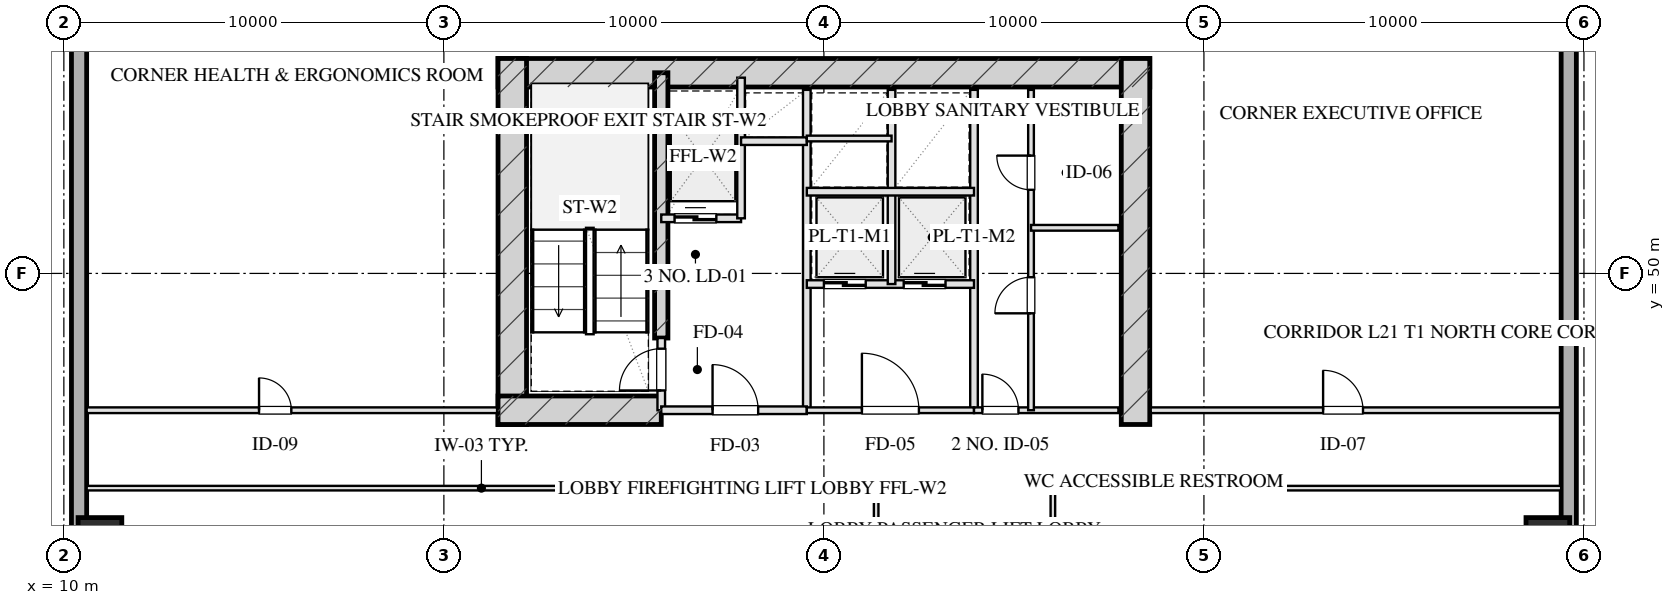
"""IFC4 building model, lengths in metres.
Left out: names, types, materials, properties, quantities, classifications, styles, units other than length and angle.
Written with IfcOpenShell. Run it as: python <this file> out.ifc"""

import sys

from ifc_helpers import new_model, si_unit, direction, frame, frame_2d, origin, origin_2d, place, context, subcontext, project, spatial, rectangle, hollow_rectangle, extrude, element, fill, save


model = new_model("IFC4")
c1 = context("Model", 3, precision=1e-05, world=origin(), true_north=direction((0.0, 1.0)))
c2 = subcontext(c1, "Body", "Model", "MODEL_VIEW")
j1 = project(units=[si_unit("LENGTHUNIT", "METRE"), si_unit("PLANEANGLEUNIT", "RADIAN")], contexts=[c1])
p1 = place(None, origin())
s1 = spatial("IfcSite", under=j1, at=p1, CompositionType="ELEMENT")
p2 = place(p1, origin())
s2 = spatial("IfcBuilding", under=s1, at=p2, CompositionType="ELEMENT")
p3 = place(p2, frame((0.0, 0.0, 85.1)))
s3 = spatial("IfcBuildingStorey", under=s2, at=p3, CompositionType="ELEMENT", Elevation=85.1)
p4 = place(p3, frame((21.425, 55.28, 0.0), z_axis=(0.0, 0.0, 1.0), x_axis=(1.0, 0.0, 0.0)))
e1 = element("IfcWall", 1, at=p4, inside=s3, PredefinedType="SHEAR", context=c2, shape_type="SweptSolid", body=[
    extrude(rectangle(XDim=17.15, YDim=0.75, at=frame_2d((8.575, 0.0))), origin(), (0.0, 0.0, 1.0), 3.45),
])
for number, where, z_axis, x_axis in (
    (2, (21.8, 46.025, 0.0), (0.0, 0.0, 1.0), (0.0, 1.0, 0.0)),
    (3, (38.2, 46.025, 0.0), (0.0, 0.0, 1.0), (0.0, 1.0, 0.0)),
):
    element("IfcWall", number, at=place(p3, frame(where, z_axis=z_axis, x_axis=x_axis)), inside=s3, PredefinedType="SHEAR", context=c2, shape_type="SweptSolid", body=[
        extrude(rectangle(XDim=9.63, YDim=0.75, at=frame_2d((4.815, 0.0))), origin(), (0.0, 0.0, 1.0), 3.45),
    ])
p5 = place(p3, frame((25.72, 48.3, 0.0), z_axis=(0.0, 0.0, 1.0), x_axis=(0.0, 1.0, 0.0)))
e4 = element("IfcWall", 4, at=p5, inside=s3, PredefinedType="SHEAR", context=c2, shape_type="SweptSolid", body=[
    extrude(rectangle(XDim=6.98, YDim=0.35, at=frame_2d((3.49, 0.0))), origin(), (0.0, 0.0, 1.0), 3.45),
])
p6 = place(p3, frame((21.425, 46.4, 0.0), z_axis=(0.0, 0.0, 1.0), x_axis=(1.0, 0.0, 0.0)))
e5 = element("IfcWall", 5, at=p6, inside=s3, PredefinedType="SHEAR", context=c2, shape_type="SweptSolid", body=[
    extrude(rectangle(XDim=4.295, YDim=0.75, at=frame_2d((2.147, 0.0))), origin(), (0.0, 0.0, 1.0), 3.45),
])
for number, where, z_axis, x_axis in (
    (6, (10.95, 43.0, 0.0), (0.0, 0.0, 1.0), (1.0, 0.0, 0.0)),
    (7, (49.05, 43.0, 0.0), (0.0, 0.0, 1.0), (1.0, 0.0, 0.0)),
):
    element("IfcColumn", number, at=place(p3, frame(where, z_axis=z_axis, x_axis=x_axis)), inside=s3, PredefinedType="COLUMN", context=c2, shape_type="SweptSolid", body=[
        extrude(hollow_rectangle(XDim=1.15, YDim=1.15, WallThickness=0.04, at=origin_2d()), origin(), (0.0, 0.0, 1.0), 3.451),
    ])
p7 = place(p3, frame((10.4, 7.2, 0.0), z_axis=(0.0, 0.0, 1.0), x_axis=(0.0, 1.0, 0.0)))
e8 = element("IfcWall", 8, at=p7, inside=s3, PredefinedType="SOLIDWALL", context=c2, shape_type="SweptSolid", body=[
    extrude(rectangle(XDim=53.6, YDim=0.4, at=frame_2d((26.8, 0.0))), origin(), (0.0, 0.0, 1.0), 2.61),
])
p8 = place(p3, frame((49.6, 60.8, 0.0), z_axis=(0.0, 0.0, 1.0), x_axis=(0.0, -1.0, 0.0)))
e9 = element("IfcWall", 9, at=p8, inside=s3, PredefinedType="SOLIDWALL", context=c2, shape_type="SweptSolid", body=[
    extrude(rectangle(XDim=53.6, YDim=0.4, at=frame_2d((26.8, 0.0))), origin(), (0.0, 0.0, 1.0), 2.61),
])
p9 = place(p8, frame((32.0, 0.0, 0.75)))
e10 = element("IfcOpeningElement", 10, at=p9, cuts=e9, PredefinedType="OPENING", context=c2, shape_type="SweptSolid", body=[
    extrude(rectangle(XDim=2.4, YDim=1.46, at=frame_2d((1.2, 0.73))), frame((0.0, 0.21, 0.0), z_axis=(0.0, -1.0, 0.0), x_axis=(1.0, 0.0, 0.0)), (0.0, 0.0, 1.0), 0.42),
])
p10 = place(p8, frame((23.0, 0.0, 0.75)))
e11 = element("IfcOpeningElement", 11, at=p10, cuts=e9, PredefinedType="OPENING", context=c2, shape_type="SweptSolid", body=[
    extrude(rectangle(XDim=2.4, YDim=1.46, at=frame_2d((1.2, 0.73))), frame((0.0, 0.21, 0.0), z_axis=(0.0, -1.0, 0.0), x_axis=(1.0, 0.0, 0.0)), (0.0, 0.0, 1.0), 0.42),
])
p11 = place(p3, frame((25.72, 46.4, 0.0), z_axis=(0.0, 0.0, 1.0), x_axis=(0.0, 1.0, 0.0)))
e12 = element("IfcWall", 12, at=p11, inside=s3, PredefinedType="PARTITIONING", context=c2, shape_type="SweptSolid", body=[
    extrude(rectangle(XDim=1.9, YDim=0.2, at=frame_2d((0.95, 0.0))), origin(), (0.0, 0.0, 1.0), 3.175),
])
p12 = place(p11, frame((0.52, 0.0, 0.0)))
e13 = element("IfcOpeningElement", 13, at=p12, cuts=e12, PredefinedType="OPENING", context=c2, shape_type="SweptSolid", body=[
    extrude(rectangle(XDim=1.1, YDim=2.05, at=frame_2d((0.55, 1.025))), frame((0.0, 0.11, 0.0), z_axis=(0.0, -1.0, 0.0), x_axis=(1.0, 0.0, 0.0)), (0.0, 0.0, 1.0), 0.22),
])
p13 = place(p3, frame((29.55, 46.4, 0.0), z_axis=(0.0, 0.0, 1.0), x_axis=(0.0, 1.0, 0.0)))
e14 = element("IfcWall", 14, at=p13, inside=s3, PredefinedType="PARTITIONING", context=c2, shape_type="SweptSolid", body=[
    extrude(rectangle(XDim=8.43, YDim=0.2, at=frame_2d((4.215, 0.0))), origin(), (0.0, 0.0, 1.0), 3.175),
])
p14 = place(p3, frame((25.72, 46.4, 0.0), z_axis=(0.0, 0.0, 1.0), x_axis=(1.0, 0.0, 0.0)))
e15 = element("IfcWall", 15, at=p14, inside=s3, PredefinedType="PARTITIONING", context=c2, shape_type="SweptSolid", body=[
    extrude(rectangle(XDim=3.83, YDim=0.2, at=frame_2d((1.915, 0.0))), origin(), (0.0, 0.0, 1.0), 3.175),
])
p15 = place(p14, frame((1.35, 0.0, 0.0)))
e16 = element("IfcOpeningElement", 16, at=p15, cuts=e15, PredefinedType="OPENING", context=c2, shape_type="SweptSolid", body=[
    extrude(rectangle(XDim=1.2, YDim=2.05, at=frame_2d((0.6, 1.025))), frame((0.0, 0.11, 0.0), z_axis=(0.0, -1.0, 0.0), x_axis=(1.0, 0.0, 0.0)), (0.0, 0.0, 1.0), 0.22),
])
p16 = place(p3, frame((25.72, 51.45, 0.0), z_axis=(0.0, 0.0, 1.0), x_axis=(1.0, 0.0, 0.0)))
e17 = element("IfcWall", 17, at=p16, inside=s3, PredefinedType="PARTITIONING", context=c2, shape_type="SweptSolid", body=[
    extrude(rectangle(XDim=2.1, YDim=0.2, at=frame_2d((1.05, 0.0))), origin(), (0.0, 0.0, 1.0), 3.175),
])
p17 = place(p16, frame((0.35, 0.0, 0.0)))
e18 = element("IfcOpeningElement", 18, at=p17, cuts=e17, PredefinedType="OPENING", context=c2, shape_type="SweptSolid", body=[
    extrude(rectangle(XDim=1.1, YDim=2.05, at=frame_2d((0.55, 1.025))), frame((0.0, 0.11, 0.0), z_axis=(0.0, -1.0, 0.0), x_axis=(1.0, 0.0, 0.0)), (0.0, 0.0, 1.0), 0.22),
])
p18 = place(p3, frame((27.82, 51.45, 0.0), z_axis=(0.0, 0.0, 1.0), x_axis=(0.0, 1.0, 0.0)))
e19 = element("IfcWall", 19, at=p18, inside=s3, PredefinedType="PARTITIONING", context=c2, shape_type="SweptSolid", body=[
    extrude(rectangle(XDim=3.7, YDim=0.2, at=frame_2d((1.85, 0.0))), origin(), (0.0, 0.0, 1.0), 3.175),
])
p19 = place(p3, frame((27.82, 53.48, 0.0), z_axis=(0.0, 0.0, 1.0), x_axis=(1.0, 0.0, 0.0)))
e20 = element("IfcWall", 20, at=p19, inside=s3, PredefinedType="PARTITIONING", context=c2, shape_type="SweptSolid", body=[
    extrude(rectangle(XDim=1.73, YDim=0.2, at=frame_2d((0.865, 0.0))), origin(), (0.0, 0.0, 1.0), 3.175),
])
p20 = place(p3, frame((33.95, 46.4, 0.0), z_axis=(0.0, 0.0, 1.0), x_axis=(0.0, 1.0, 0.0)))
e21 = element("IfcWall", 21, at=p20, inside=s3, PredefinedType="PARTITIONING", context=c2, shape_type="SweptSolid", body=[
    extrude(rectangle(XDim=8.43, YDim=0.2, at=frame_2d((4.215, 0.0))), origin(), (0.0, 0.0, 1.0), 3.175),
])
p21 = place(p3, frame((29.55, 46.4, 0.0), z_axis=(0.0, 0.0, 1.0), x_axis=(1.0, 0.0, 0.0)))
e22 = element("IfcWall", 22, at=p21, inside=s3, PredefinedType="PARTITIONING", context=c2, shape_type="SweptSolid", body=[
    extrude(rectangle(XDim=4.4, YDim=0.15, at=frame_2d((2.2, 0.0))), origin(), (0.0, 0.0, 1.0), 3.175),
])
p22 = place(p21, frame((1.45, 0.0, 0.0)))
e23 = element("IfcOpeningElement", 23, at=p22, cuts=e22, PredefinedType="OPENING", context=c2, shape_type="SweptSolid", body=[
    extrude(rectangle(XDim=1.5, YDim=2.05, at=frame_2d((0.75, 1.025))), frame((0.0, 0.085, 0.0), z_axis=(0.0, -1.0, 0.0), x_axis=(1.0, 0.0, 0.0)), (0.0, 0.0, 1.0), 0.17),
])
p23 = place(p3, frame((29.55, 49.72, 0.0), z_axis=(0.0, 0.0, 1.0), x_axis=(1.0, 0.0, 0.0)))
e24 = element("IfcWall", 24, at=p23, inside=s3, PredefinedType="PARTITIONING", context=c2, shape_type="SweptSolid", body=[
    extrude(rectangle(XDim=4.4, YDim=0.2, at=frame_2d((2.2, 0.0))), origin(), (0.0, 0.0, 1.0), 3.175),
])
p24 = place(p23, frame((0.45, 0.0, 0.0)))
e25 = element("IfcOpeningElement", 25, at=p24, cuts=e24, PredefinedType="OPENING", context=c2, shape_type="SweptSolid", body=[
    extrude(rectangle(XDim=1.1, YDim=2.05, at=frame_2d((0.55, 1.025))), frame((0.0, 0.11, 0.0), z_axis=(0.0, -1.0, 0.0), x_axis=(1.0, 0.0, 0.0)), (0.0, 0.0, 1.0), 0.22),
])
p25 = place(p23, frame((2.55, 0.0, 0.0)))
e26 = element("IfcOpeningElement", 26, at=p25, cuts=e24, PredefinedType="OPENING", context=c2, shape_type="SweptSolid", body=[
    extrude(rectangle(XDim=1.1, YDim=2.05, at=frame_2d((0.55, 1.025))), frame((0.0, 0.11, 0.0), z_axis=(0.0, -1.0, 0.0), x_axis=(1.0, 0.0, 0.0)), (0.0, 0.0, 1.0), 0.22),
])
p26 = place(p3, frame((31.78, 49.72, 0.0), z_axis=(0.0, 0.0, 1.0), x_axis=(0.0, 1.0, 0.0)))
e27 = element("IfcWall", 27, at=p26, inside=s3, PredefinedType="PARTITIONING", context=c2, shape_type="SweptSolid", body=[
    extrude(rectangle(XDim=5.11, YDim=0.2, at=frame_2d((2.555, 0.0))), origin(), (0.0, 0.0, 1.0), 3.175),
])
p27 = place(p3, frame((29.55, 52.15, 0.0), z_axis=(0.0, 0.0, 1.0), x_axis=(1.0, 0.0, 0.0)))
e28 = element("IfcWall", 28, at=p27, inside=s3, PredefinedType="PARTITIONING", context=c2, shape_type="SweptSolid", body=[
    extrude(rectangle(XDim=4.4, YDim=0.2, at=frame_2d((2.2, 0.0))), origin(), (0.0, 0.0, 1.0), 3.175),
])
p28 = place(p3, frame((29.55, 53.55, 0.0), z_axis=(0.0, 0.0, 1.0), x_axis=(1.0, 0.0, 0.0)))
e29 = element("IfcWall", 29, at=p28, inside=s3, PredefinedType="PARTITIONING", context=c2, shape_type="SweptSolid", body=[
    extrude(rectangle(XDim=2.23, YDim=0.15, at=frame_2d((1.115, 0.0))), origin(), (0.0, 0.0, 1.0), 3.175),
])
p29 = place(p3, frame((33.95, 46.4, 0.0), z_axis=(0.0, 0.0, 1.0), x_axis=(1.0, 0.0, 0.0)))
e30 = element("IfcWall", 30, at=p29, inside=s3, PredefinedType="PARTITIONING", context=c2, shape_type="SweptSolid", body=[
    extrude(rectangle(XDim=3.8, YDim=0.15, at=frame_2d((1.9, 0.0))), origin(), (0.0, 0.0, 1.0), 3.175),
])
p30 = place(p29, frame((0.22, 0.0, 0.0)))
e31 = element("IfcOpeningElement", 31, at=p30, cuts=e30, PredefinedType="OPENING", context=c2, shape_type="SweptSolid", body=[
    extrude(rectangle(XDim=0.95, YDim=2.05, at=frame_2d((0.475, 1.025))), frame((0.0, 0.085, 0.0), z_axis=(0.0, -1.0, 0.0), x_axis=(1.0, 0.0, 0.0)), (0.0, 0.0, 1.0), 0.17),
])
p31 = place(p3, frame((35.45, 46.4, 0.0), z_axis=(0.0, 0.0, 1.0), x_axis=(0.0, 1.0, 0.0)))
e32 = element("IfcWall", 32, at=p31, inside=s3, PredefinedType="PARTITIONING", context=c2, shape_type="SweptSolid", body=[
    extrude(rectangle(XDim=8.43, YDim=0.15, at=frame_2d((4.215, 0.0))), origin(), (0.0, 0.0, 1.0), 2.815),
])
p32 = place(p31, frame((2.55, 0.0, 0.0)))
e33 = element("IfcOpeningElement", 33, at=p32, cuts=e32, PredefinedType="OPENING", context=c2, shape_type="SweptSolid", body=[
    extrude(rectangle(XDim=0.95, YDim=2.05, at=frame_2d((0.475, 1.025))), frame((0.0, 0.085, 0.0), z_axis=(0.0, -1.0, 0.0), x_axis=(1.0, 0.0, 0.0)), (0.0, 0.0, 1.0), 0.17),
])
p33 = place(p31, frame((5.8, 0.0, 0.0)))
e34 = element("IfcOpeningElement", 34, at=p33, cuts=e32, PredefinedType="OPENING", context=c2, shape_type="SweptSolid", body=[
    extrude(rectangle(XDim=0.9, YDim=2.05, at=frame_2d((0.45, 1.025))), frame((0.0, 0.085, 0.0), z_axis=(0.0, -1.0, 0.0), x_axis=(1.0, 0.0, 0.0)), (0.0, 0.0, 1.0), 0.17),
])
p34 = place(p3, frame((35.45, 51.2, 0.0), z_axis=(0.0, 0.0, 1.0), x_axis=(1.0, 0.0, 0.0)))
e35 = element("IfcWall", 35, at=p34, inside=s3, PredefinedType="PARTITIONING", context=c2, shape_type="SweptSolid", body=[
    extrude(rectangle(XDim=2.3, YDim=0.15, at=frame_2d((1.15, 0.0))), origin(), (0.0, 0.0, 1.0), 3.175),
])
p35 = place(p3, frame((10.6, 46.4, 0.0), z_axis=(0.0, 0.0, 1.0), x_axis=(1.0, 0.0, 0.0)))
e36 = element("IfcWall", 36, at=p35, inside=s3, PredefinedType="PARTITIONING", context=c2, shape_type="SweptSolid", body=[
    extrude(rectangle(XDim=10.8, YDim=0.15, at=frame_2d((5.4, 0.0))), origin(), (0.0, 0.0, 1.0), 3.175),
])
p36 = place(p35, frame((4.536, 0.0, 0.0)))
e37 = element("IfcOpeningElement", 37, at=p36, cuts=e36, PredefinedType="OPENING", context=c2, shape_type="SweptSolid", body=[
    extrude(rectangle(XDim=0.85, YDim=2.05, at=frame_2d((0.425, 1.025))), frame((0.0, 0.085, 0.0), z_axis=(0.0, -1.0, 0.0), x_axis=(1.0, 0.0, 0.0)), (0.0, 0.0, 1.0), 0.17),
])
p37 = place(p3, frame((38.6, 46.4, 0.0), z_axis=(0.0, 0.0, 1.0), x_axis=(1.0, 0.0, 0.0)))
e38 = element("IfcWall", 38, at=p37, inside=s3, PredefinedType="PARTITIONING", context=c2, shape_type="SweptSolid", body=[
    extrude(rectangle(XDim=10.8, YDim=0.15, at=frame_2d((5.4, 0.0))), origin(), (0.0, 0.0, 1.0), 3.175),
])
p38 = place(p37, frame((4.536, 0.0, 0.0)))
e39 = element("IfcOpeningElement", 39, at=p38, cuts=e38, PredefinedType="OPENING", context=c2, shape_type="SweptSolid", body=[
    extrude(rectangle(XDim=1.05, YDim=2.05, at=frame_2d((0.525, 1.025))), frame((0.0, 0.085, 0.0), z_axis=(0.0, -1.0, 0.0), x_axis=(1.0, 0.0, 0.0)), (0.0, 0.0, 1.0), 0.17),
])
p39 = place(p3, frame((10.6, 44.35, 0.0), z_axis=(0.0, 0.0, 1.0), x_axis=(1.0, 0.0, 0.0)))
e40 = element("IfcWall", 40, at=p39, inside=s3, PredefinedType="PARTITIONING", context=c2, shape_type="SweptSolid", body=[
    extrude(rectangle(XDim=20.775, YDim=0.12, at=frame_2d((10.387, 0.0))), origin(), (0.0, 0.0, 1.0), 3.175),
])
p40 = place(p3, frame((36.025, 44.35, 0.0), z_axis=(0.0, 0.0, 1.0), x_axis=(1.0, 0.0, 0.0)))
e41 = element("IfcWall", 41, at=p40, inside=s3, PredefinedType="PARTITIONING", context=c2, shape_type="SweptSolid", body=[
    extrude(rectangle(XDim=13.375, YDim=0.12, at=frame_2d((6.688, 0.0))), origin(), (0.0, 0.0, 1.0), 3.175),
])
p41 = place(p3, frame((31.375, 23.65, 0.0), z_axis=(0.0, 0.0, 1.0), x_axis=(0.0, 1.0, 0.0)))
e42 = element("IfcWall", 42, at=p41, inside=s3, PredefinedType="PARTITIONING", context=c2, shape_type="SweptSolid", body=[
    extrude(rectangle(XDim=20.7, YDim=0.12, at=frame_2d((10.35, 0.0))), origin(), (0.0, 0.0, 1.0), 3.175),
])
p42 = place(p41, frame((0.775, 0.0, 0.0)))
e43 = element("IfcOpeningElement", 43, at=p42, cuts=e42, PredefinedType="OPENING", context=c2, shape_type="SweptSolid", body=[
    extrude(rectangle(XDim=1.0, YDim=2.05, at=frame_2d((0.5, 1.025))), frame((0.0, 0.07, 0.0), z_axis=(0.0, -1.0, 0.0), x_axis=(1.0, 0.0, 0.0)), (0.0, 0.0, 1.0), 0.14),
])
p43 = place(p41, frame((5.35, 0.0, 0.0)))
e44 = element("IfcOpeningElement", 44, at=p43, cuts=e42, PredefinedType="OPENING", context=c2, shape_type="SweptSolid", body=[
    extrude(rectangle(XDim=1.0, YDim=2.05, at=frame_2d((0.5, 1.025))), frame((0.0, 0.07, 0.0), z_axis=(0.0, -1.0, 0.0), x_axis=(1.0, 0.0, 0.0)), (0.0, 0.0, 1.0), 0.14),
])
p44 = place(p41, frame((9.85, 0.0, 0.0)))
e45 = element("IfcOpeningElement", 45, at=p44, cuts=e42, PredefinedType="OPENING", context=c2, shape_type="SweptSolid", body=[
    extrude(rectangle(XDim=1.0, YDim=2.05, at=frame_2d((0.5, 1.025))), frame((0.0, 0.07, 0.0), z_axis=(0.0, -1.0, 0.0), x_axis=(1.0, 0.0, 0.0)), (0.0, 0.0, 1.0), 0.14),
])
p45 = place(p41, frame((12.95, 0.0, 0.0)))
e46 = element("IfcOpeningElement", 46, at=p45, cuts=e42, PredefinedType="OPENING", context=c2, shape_type="SweptSolid", body=[
    extrude(rectangle(XDim=1.0, YDim=2.05, at=frame_2d((0.5, 1.025))), frame((0.0, 0.07, 0.0), z_axis=(0.0, -1.0, 0.0), x_axis=(1.0, 0.0, 0.0)), (0.0, 0.0, 1.0), 0.14),
])
p46 = place(p41, frame((17.525, 0.0, 0.0)))
e47 = element("IfcOpeningElement", 47, at=p46, cuts=e42, PredefinedType="OPENING", context=c2, shape_type="SweptSolid", body=[
    extrude(rectangle(XDim=1.0, YDim=2.05, at=frame_2d((0.5, 1.025))), frame((0.0, 0.07, 0.0), z_axis=(0.0, -1.0, 0.0), x_axis=(1.0, 0.0, 0.0)), (0.0, 0.0, 1.0), 0.14),
])
p47 = place(p3, frame((36.025, 23.65, 0.0), z_axis=(0.0, 0.0, 1.0), x_axis=(0.0, 1.0, 0.0)))
e48 = element("IfcWall", 48, at=p47, inside=s3, PredefinedType="PARTITIONING", context=c2, shape_type="SweptSolid", body=[
    extrude(rectangle(XDim=20.7, YDim=0.12, at=frame_2d((10.35, 0.0))), origin(), (0.0, 0.0, 1.0), 3.175),
])
p48 = place(p47, frame((4.075, 0.0, 0.0)))
e49 = element("IfcOpeningElement", 49, at=p48, cuts=e48, PredefinedType="OPENING", context=c2, shape_type="SweptSolid", body=[
    extrude(rectangle(XDim=1.0, YDim=2.05, at=frame_2d((0.5, 1.025))), frame((0.0, 0.07, 0.0), z_axis=(0.0, -1.0, 0.0), x_axis=(1.0, 0.0, 0.0)), (0.0, 0.0, 1.0), 0.14),
])
p49 = place(p47, frame((11.75, 0.0, 0.0)))
e50 = element("IfcOpeningElement", 50, at=p49, cuts=e48, PredefinedType="OPENING", context=c2, shape_type="SweptSolid", body=[
    extrude(rectangle(XDim=1.05, YDim=2.05, at=frame_2d((0.525, 1.025))), frame((0.0, 0.07, 0.0), z_axis=(0.0, -1.0, 0.0), x_axis=(1.0, 0.0, 0.0)), (0.0, 0.0, 1.0), 0.14),
])
p50 = place(p47, frame((17.525, 0.0, 0.0)))
e51 = element("IfcOpeningElement", 51, at=p50, cuts=e48, PredefinedType="OPENING", context=c2, shape_type="SweptSolid", body=[
    extrude(rectangle(XDim=1.0, YDim=2.05, at=frame_2d((0.5, 1.025))), frame((0.0, 0.07, 0.0), z_axis=(0.0, -1.0, 0.0), x_axis=(1.0, 0.0, 0.0)), (0.0, 0.0, 1.0), 0.14),
])
p51 = place(p12, origin())
e52 = element("IfcDoor", 52, at=p51, inside=s3, OperationType="SINGLE_SWING_LEFT", PredefinedType="DOOR", context=c2, shape_type="SweptSolid", body=[
    extrude(rectangle(XDim=1.1, YDim=2.05, at=frame_2d((0.55, 1.025))), frame((0.0, 0.025, 0.0), z_axis=(0.0, -1.0, 0.0), x_axis=(1.0, 0.0, 0.0)), (0.0, 0.0, 1.0), 0.05),
])
fill(e13, e52)
p52 = place(p15, origin())
e53 = element("IfcDoor", 53, at=p52, inside=s3, OperationType="SINGLE_SWING_LEFT", PredefinedType="DOOR", context=c2, shape_type="SweptSolid", body=[
    extrude(rectangle(XDim=1.2, YDim=2.05, at=frame_2d((0.6, 1.025))), frame((0.0, 0.025, 0.0), z_axis=(0.0, -1.0, 0.0), x_axis=(1.0, 0.0, 0.0)), (0.0, 0.0, 1.0), 0.05),
])
fill(e16, e53)
p53 = place(p17, origin())
e54 = element("IfcDoor", 54, at=p53, inside=s3, OperationType="DOUBLE_DOOR_SLIDING", PredefinedType="DOOR", context=c2, shape_type="SweptSolid", body=[
    extrude(rectangle(XDim=1.1, YDim=2.05, at=frame_2d((0.55, 1.025))), frame((0.0, 0.025, 0.0), z_axis=(0.0, -1.0, 0.0), x_axis=(1.0, 0.0, 0.0)), (0.0, 0.0, 1.0), 0.05),
])
fill(e18, e54)
p54 = place(p22, origin())
e55 = element("IfcDoor", 55, at=p54, inside=s3, OperationType="SINGLE_SWING_LEFT", PredefinedType="DOOR", context=c2, shape_type="SweptSolid", body=[
    extrude(rectangle(XDim=1.5, YDim=2.05, at=frame_2d((0.75, 1.025))), frame((0.0, 0.025, 0.0), z_axis=(0.0, -1.0, 0.0), x_axis=(1.0, 0.0, 0.0)), (0.0, 0.0, 1.0), 0.05),
])
fill(e23, e55)
p55 = place(p24, origin())
e56 = element("IfcDoor", 56, at=p55, inside=s3, OperationType="DOUBLE_DOOR_SLIDING", PredefinedType="DOOR", context=c2, shape_type="SweptSolid", body=[
    extrude(rectangle(XDim=1.1, YDim=2.05, at=frame_2d((0.55, 1.025))), frame((0.0, 0.025, 0.0), z_axis=(0.0, -1.0, 0.0), x_axis=(1.0, 0.0, 0.0)), (0.0, 0.0, 1.0), 0.05),
])
fill(e25, e56)
p56 = place(p25, origin())
e57 = element("IfcDoor", 57, at=p56, inside=s3, OperationType="DOUBLE_DOOR_SLIDING", PredefinedType="DOOR", context=c2, shape_type="SweptSolid", body=[
    extrude(rectangle(XDim=1.1, YDim=2.05, at=frame_2d((0.55, 1.025))), frame((0.0, 0.025, 0.0), z_axis=(0.0, -1.0, 0.0), x_axis=(1.0, 0.0, 0.0)), (0.0, 0.0, 1.0), 0.05),
])
fill(e26, e57)
p57 = place(p30, origin())
e58 = element("IfcDoor", 58, at=p57, inside=s3, OperationType="SINGLE_SWING_LEFT", PredefinedType="DOOR", context=c2, shape_type="SweptSolid", body=[
    extrude(rectangle(XDim=0.95, YDim=2.05, at=frame_2d((0.475, 1.025))), frame((0.0, 0.025, 0.0), z_axis=(0.0, -1.0, 0.0), x_axis=(1.0, 0.0, 0.0)), (0.0, 0.0, 1.0), 0.05),
])
fill(e31, e58)
p58 = place(p32, origin())
e59 = element("IfcDoor", 59, at=p58, inside=s3, OperationType="SINGLE_SWING_LEFT", PredefinedType="DOOR", context=c2, shape_type="SweptSolid", body=[
    extrude(rectangle(XDim=0.95, YDim=2.05, at=frame_2d((0.475, 1.025))), frame((0.0, 0.025, 0.0), z_axis=(0.0, -1.0, 0.0), x_axis=(1.0, 0.0, 0.0)), (0.0, 0.0, 1.0), 0.05),
])
fill(e33, e59)
p59 = place(p33, origin())
e60 = element("IfcDoor", 60, at=p59, inside=s3, OperationType="SINGLE_SWING_RIGHT", PredefinedType="DOOR", context=c2, shape_type="SweptSolid", body=[
    extrude(rectangle(XDim=0.9, YDim=2.05, at=frame_2d((0.45, 1.025))), frame((0.0, 0.025, 0.0), z_axis=(0.0, -1.0, 0.0), x_axis=(1.0, 0.0, 0.0)), (0.0, 0.0, 1.0), 0.05),
])
fill(e34, e60)
p60 = place(p36, origin())
e61 = element("IfcDoor", 61, at=p60, inside=s3, OperationType="SINGLE_SWING_LEFT", PredefinedType="DOOR", context=c2, shape_type="SweptSolid", body=[
    extrude(rectangle(XDim=0.85, YDim=2.05, at=frame_2d((0.425, 1.025))), frame((0.0, 0.025, 0.0), z_axis=(0.0, -1.0, 0.0), x_axis=(1.0, 0.0, 0.0)), (0.0, 0.0, 1.0), 0.05),
])
fill(e37, e61)
p61 = place(p38, origin())
e62 = element("IfcDoor", 62, at=p61, inside=s3, OperationType="SINGLE_SWING_LEFT", PredefinedType="DOOR", context=c2, shape_type="SweptSolid", body=[
    extrude(rectangle(XDim=1.05, YDim=2.05, at=frame_2d((0.525, 1.025))), frame((0.0, 0.025, 0.0), z_axis=(0.0, -1.0, 0.0), x_axis=(1.0, 0.0, 0.0)), (0.0, 0.0, 1.0), 0.05),
])
fill(e39, e62)
save(model, sys.argv[1])
